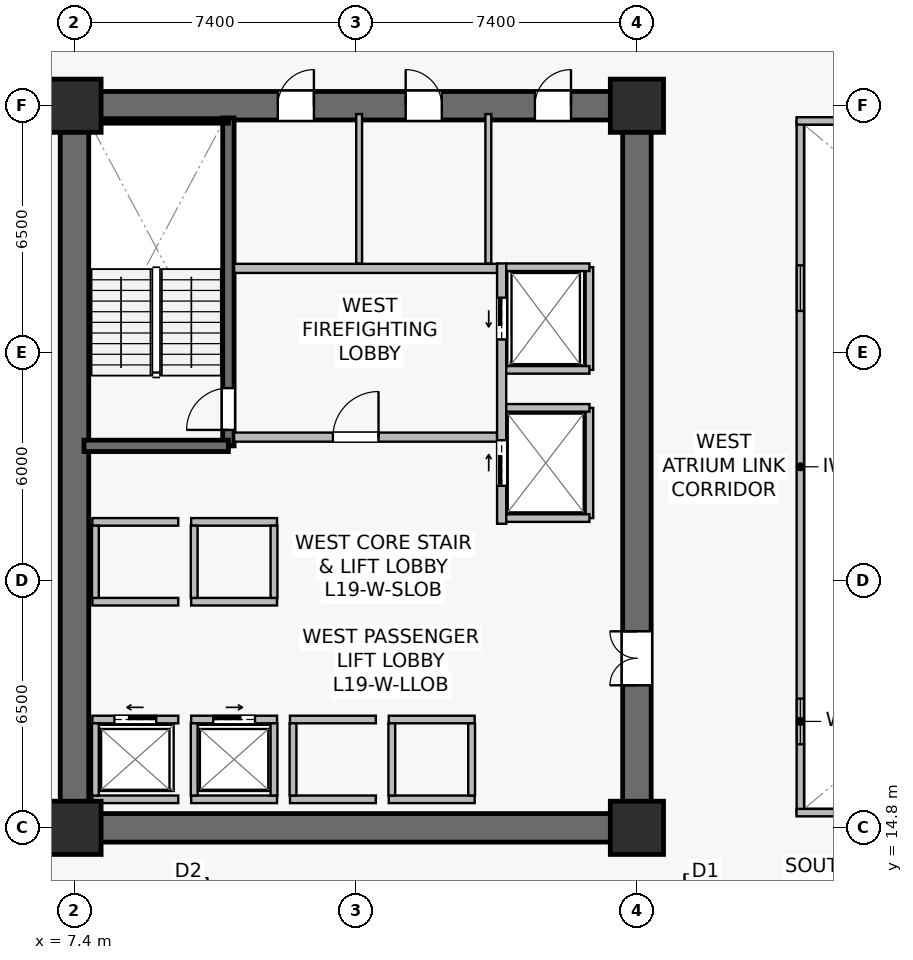
"""IFC4 building model, lengths in metres.
Left out: names, types, materials, properties, quantities, classifications, styles, units other than length and angle.
Written with IfcOpenShell. Run it as: python <this file> out.ifc"""

import sys

from ifc_helpers import new_model, si_unit, direction, frame, frame_2d, origin, origin_2d, place, context, subcontext, project, spatial, rectangle, extrude, source, transform, mapped, element, fill, save


model = new_model("IFC4")
c1 = context("Model", 3, precision=1e-05, world=origin(), true_north=direction((0.0, 1.0)))
c2 = subcontext(c1, "Body", "Model", "MODEL_VIEW")
j1 = project(units=[si_unit("LENGTHUNIT", "METRE"), si_unit("PLANEANGLEUNIT", "RADIAN")], contexts=[c1])
p1 = place(None, origin())
s1 = spatial("IfcSite", under=j1, at=p1, CompositionType="ELEMENT")
p2 = place(p1, origin())
s2 = spatial("IfcBuilding", under=s1, at=p2, CompositionType="ELEMENT")
p3 = place(p2, frame((0.0, 0.0, 78.5)))
s3 = spatial("IfcBuildingStorey", under=s2, at=p3, CompositionType="ELEMENT", Elevation=78.5)
p4 = place(p3, frame((7.025, 14.8, 0.0), z_axis=(0.0, 0.0, 1.0), x_axis=(1.0, 0.0, 0.0)))
e1 = element("IfcWall", 1, at=p4, inside=s3, PredefinedType="SHEAR", context=c2, shape_type="SweptSolid", body=[
    extrude(rectangle(XDim=15.55, YDim=0.75, at=frame_2d((7.775, 0.0))), origin(), (0.0, 0.0, 1.0), 3.78),
])
p5 = place(p3, frame((7.025, 33.8, 0.0), z_axis=(0.0, 0.0, 1.0), x_axis=(1.0, 0.0, 0.0)))
e2 = element("IfcWall", 2, at=p5, inside=s3, PredefinedType="SHEAR", context=c2, shape_type="SweptSolid", body=[
    extrude(rectangle(XDim=15.55, YDim=0.75, at=frame_2d((7.775, 0.0))), origin(), (0.0, 0.0, 1.0), 3.78),
])
p6 = place(p5, frame((5.725, 0.0, 0.0)))
e3 = element("IfcOpeningElement", 3, at=p6, cuts=e2, PredefinedType="OPENING", context=c2, shape_type="SweptSolid", body=[
    extrude(rectangle(XDim=0.95, YDim=2.15, at=frame_2d((0.475, 1.075))), frame((0.0, 0.385, 0.0), z_axis=(0.0, -1.0, 0.0), x_axis=(1.0, 0.0, 0.0)), (0.0, 0.0, 1.0), 0.77),
])
p7 = place(p5, frame((9.09, 0.0, 0.0)))
e4 = element("IfcOpeningElement", 4, at=p7, cuts=e2, PredefinedType="OPENING", context=c2, shape_type="SweptSolid", body=[
    extrude(rectangle(XDim=0.95, YDim=2.15, at=frame_2d((0.475, 1.075))), frame((0.0, 0.385, 0.0), z_axis=(0.0, -1.0, 0.0), x_axis=(1.0, 0.0, 0.0)), (0.0, 0.0, 1.0), 0.77),
])
p8 = place(p5, frame((12.49, 0.0, 0.0)))
e5 = element("IfcOpeningElement", 5, at=p8, cuts=e2, PredefinedType="OPENING", context=c2, shape_type="SweptSolid", body=[
    extrude(rectangle(XDim=0.95, YDim=2.15, at=frame_2d((0.475, 1.075))), frame((0.0, 0.385, 0.0), z_axis=(0.0, -1.0, 0.0), x_axis=(1.0, 0.0, 0.0)), (0.0, 0.0, 1.0), 0.77),
])
p9 = place(p3, frame((7.4, 15.175, 0.0), z_axis=(0.0, 0.0, 1.0), x_axis=(0.0, 1.0, 0.0)))
e6 = element("IfcWall", 6, at=p9, inside=s3, PredefinedType="SHEAR", context=c2, shape_type="SweptSolid", body=[
    extrude(rectangle(XDim=18.25, YDim=0.75, at=frame_2d((9.125, 0.0))), origin(), (0.0, 0.0, 1.0), 3.78),
])
p10 = place(p3, frame((22.2, 15.175, 0.0), z_axis=(0.0, 0.0, 1.0), x_axis=(0.0, 1.0, 0.0)))
e7 = element("IfcWall", 7, at=p10, inside=s3, PredefinedType="SHEAR", context=c2, shape_type="SweptSolid", body=[
    extrude(rectangle(XDim=18.25, YDim=0.75, at=frame_2d((9.125, 0.0))), origin(), (0.0, 0.0, 1.0), 3.78),
])
p11 = place(p10, frame((3.375, 0.0, 0.0)))
e8 = element("IfcOpeningElement", 8, at=p11, cuts=e7, PredefinedType="OPENING", context=c2, shape_type="SweptSolid", body=[
    extrude(rectangle(XDim=1.42, YDim=2.2, at=frame_2d((0.71, 1.1))), frame((0.0, 0.385, 0.0), z_axis=(0.0, -1.0, 0.0), x_axis=(1.0, 0.0, 0.0)), (0.0, 0.0, 1.0), 0.77),
])
p12 = place(p3, frame((11.45, 24.85, 0.0), z_axis=(0.0, 0.0, 1.0), x_axis=(0.0, 1.0, 0.0)))
e9 = element("IfcWall", 9, at=p12, inside=s3, PredefinedType="SHEAR", context=c2, shape_type="SweptSolid", body=[
    extrude(rectangle(XDim=8.63, YDim=0.3, at=frame_2d((4.315, 0.0))), origin(), (0.0, 0.0, 1.0), 3.78),
])
p13 = place(p12, frame((0.42, 0.0, 0.0)))
e10 = element("IfcOpeningElement", 10, at=p13, cuts=e9, PredefinedType="OPENING", context=c2, shape_type="SweptSolid", body=[
    extrude(rectangle(XDim=1.1, YDim=2.15, at=frame_2d((0.55, 1.075))), frame((0.0, 0.16, 0.0), z_axis=(0.0, -1.0, 0.0), x_axis=(1.0, 0.0, 0.0)), (0.0, 0.0, 1.0), 0.32),
])
p14 = place(p3, frame((7.65, 24.85, 0.0), z_axis=(0.0, 0.0, 1.0), x_axis=(1.0, 0.0, 0.0)))
e11 = element("IfcWall", 11, at=p14, inside=s3, PredefinedType="SHEAR", context=c2, shape_type="SweptSolid", body=[
    extrude(rectangle(XDim=3.8, YDim=0.3, at=frame_2d((1.9, 0.0))), origin(), (0.0, 0.0, 1.0), 3.78),
])
p15 = place(p3, frame((7.73, 33.4, 0.0), z_axis=(0.0, 0.0, 1.0), x_axis=(1.0, 0.0, 0.0)))
e12 = element("IfcWall", 12, at=p15, inside=s3, PredefinedType="SOLIDWALL", context=c2, shape_type="SweptSolid", body=[
    extrude(rectangle(XDim=3.72, YDim=0.12, at=frame_2d((1.86, 0.0))), origin(), (0.0, 0.0, 1.0), 3.78),
])
m1 = source(origin(), c2, "Body", "SweptSolid", [
    extrude(rectangle(XDim=1.4, YDim=1.4, at=origin_2d()), origin(), (0.0, 0.0, 1.0), 4.1),
])
for number, where, z_axis, x_axis in (
    (13, (7.4, 14.8, 0.0), (0.0, 0.0, 1.0), (1.0, 0.0, 0.0)),
    (14, (22.2, 14.8, 0.0), (0.0, 0.0, 1.0), (1.0, 0.0, 0.0)),
    (15, (7.4, 33.8, 0.0), (0.0, 0.0, 1.0), (1.0, 0.0, 0.0)),
    (16, (22.2, 33.8, 0.0), (0.0, 0.0, 1.0), (1.0, 0.0, 0.0)),
):
    element("IfcColumn", number, at=place(p3, frame(where, z_axis=z_axis, x_axis=x_axis)), inside=s3, PredefinedType="COLUMN", context=c2, shape_type="MappedRepresentation", body=[
        mapped(m1, transform((0.0, 0.0, 0.0), scale=1.0)),
    ])
p16 = place(p3, frame((11.6, 25.08, 0.0), z_axis=(0.0, 0.0, 1.0), x_axis=(1.0, 0.0, 0.0)))
e17 = element("IfcWall", 17, at=p16, inside=s3, PredefinedType="SOLIDWALL", context=c2, shape_type="SweptSolid", body=[
    extrude(rectangle(XDim=6.92, YDim=0.24, at=frame_2d((3.46, 0.0))), origin(), (0.0, 0.0, 1.0), 3.115),
])
p17 = place(p16, frame((2.6, 0.0, 0.0)))
e18 = element("IfcOpeningElement", 18, at=p17, cuts=e17, PredefinedType="OPENING", context=c2, shape_type="SweptSolid", body=[
    extrude(rectangle(XDim=1.2, YDim=2.16, at=frame_2d((0.6, 1.08))), frame((0.0, 0.13, 0.0), z_axis=(0.0, -1.0, 0.0), x_axis=(1.0, 0.0, 0.0)), (0.0, 0.0, 1.0), 0.26),
])
p18 = place(p3, frame((11.6, 29.52, 0.0), z_axis=(0.0, 0.0, 1.0), x_axis=(1.0, 0.0, 0.0)))
e19 = element("IfcWall", 19, at=p18, inside=s3, PredefinedType="SOLIDWALL", context=c2, shape_type="SweptSolid", body=[
    extrude(rectangle(XDim=6.92, YDim=0.24, at=frame_2d((3.46, 0.0))), origin(), (0.0, 0.0, 1.0), 3.115),
])
p19 = place(p3, frame((18.64, 22.8, 0.0), z_axis=(0.0, 0.0, 1.0), x_axis=(0.0, 1.0, 0.0)))
e20 = element("IfcWall", 20, at=p19, inside=s3, PredefinedType="SOLIDWALL", context=c2, shape_type="SweptSolid", body=[
    extrude(rectangle(XDim=6.85, YDim=0.24, at=frame_2d((3.425, 0.0))), origin(), (0.0, 0.0, 1.0), 2.865),
])
p20 = place(p19, frame((4.85, 0.0, 0.0)))
e21 = element("IfcOpeningElement", 21, at=p20, cuts=e20, PredefinedType="OPENING", context=c2, shape_type="SweptSolid", body=[
    extrude(rectangle(XDim=1.1, YDim=2.22, at=frame_2d((0.55, 1.11))), frame((0.0, 0.13, 0.0), z_axis=(0.0, -1.0, 0.0), x_axis=(1.0, 0.0, 0.0)), (0.0, 0.0, 1.0), 0.26),
])
p21 = place(p19, frame((1.0, 0.0, 0.0)))
e22 = element("IfcOpeningElement", 22, at=p21, cuts=e20, PredefinedType="OPENING", context=c2, shape_type="SweptSolid", body=[
    extrude(rectangle(XDim=1.2, YDim=2.22, at=frame_2d((0.6, 1.11))), frame((0.0, 0.13, 0.0), z_axis=(0.0, -1.0, 0.0), x_axis=(1.0, 0.0, 0.0)), (0.0, 0.0, 1.0), 0.26),
])
p22 = place(p3, frame((7.87, 17.65, 0.0), z_axis=(0.0, 0.0, 1.0), x_axis=(1.0, 0.0, 0.0)))
e23 = element("IfcWall", 23, at=p22, inside=s3, PredefinedType="SOLIDWALL", context=c2, shape_type="SweptSolid", body=[
    extrude(rectangle(XDim=2.26, YDim=0.2, at=frame_2d((1.13, 0.0))), origin(), (0.0, 0.0, 1.0), 3.78),
])
p23 = place(p22, frame((0.58, 0.0, 0.0)))
e24 = element("IfcOpeningElement", 24, at=p23, cuts=e23, PredefinedType="OPENING", context=c2, shape_type="SweptSolid", body=[
    extrude(rectangle(XDim=1.1, YDim=2.22, at=frame_2d((0.55, 1.11))), frame((0.0, 0.11, 0.0), z_axis=(0.0, -1.0, 0.0), x_axis=(1.0, 0.0, 0.0)), (0.0, 0.0, 1.0), 0.22),
])
p24 = place(p3, frame((7.87, 15.55, 0.0), z_axis=(0.0, 0.0, 1.0), x_axis=(1.0, 0.0, 0.0)))
e25 = element("IfcWall", 25, at=p24, inside=s3, PredefinedType="SOLIDWALL", context=c2, shape_type="SweptSolid", body=[
    extrude(rectangle(XDim=2.26, YDim=0.2, at=frame_2d((1.13, 0.0))), origin(), (0.0, 0.0, 1.0), 3.78),
])
p25 = place(p3, frame((7.95, 15.65, 0.0), z_axis=(0.0, 0.0, 1.0), x_axis=(0.0, 1.0, 0.0)))
e26 = element("IfcWall", 26, at=p25, inside=s3, PredefinedType="SOLIDWALL", context=c2, shape_type="SweptSolid", body=[
    extrude(rectangle(XDim=1.9, YDim=0.18, at=frame_2d((0.95, 0.0))), origin(), (0.0, 0.0, 1.0), 3.78),
])
p26 = place(p3, frame((10.47, 17.65, 0.0), z_axis=(0.0, 0.0, 1.0), x_axis=(1.0, 0.0, 0.0)))
e27 = element("IfcWall", 27, at=p26, inside=s3, PredefinedType="SOLIDWALL", context=c2, shape_type="SweptSolid", body=[
    extrude(rectangle(XDim=2.26, YDim=0.2, at=frame_2d((1.13, 0.0))), origin(), (0.0, 0.0, 1.0), 3.78),
])
p27 = place(p26, frame((0.58, 0.0, 0.0)))
e28 = element("IfcOpeningElement", 28, at=p27, cuts=e27, PredefinedType="OPENING", context=c2, shape_type="SweptSolid", body=[
    extrude(rectangle(XDim=1.1, YDim=2.22, at=frame_2d((0.55, 1.11))), frame((0.0, 0.11, 0.0), z_axis=(0.0, -1.0, 0.0), x_axis=(1.0, 0.0, 0.0)), (0.0, 0.0, 1.0), 0.22),
])
p28 = place(p3, frame((10.47, 15.55, 0.0), z_axis=(0.0, 0.0, 1.0), x_axis=(1.0, 0.0, 0.0)))
e29 = element("IfcWall", 29, at=p28, inside=s3, PredefinedType="SOLIDWALL", context=c2, shape_type="SweptSolid", body=[
    extrude(rectangle(XDim=2.26, YDim=0.2, at=frame_2d((1.13, 0.0))), origin(), (0.0, 0.0, 1.0), 3.78),
])
for number, where, z_axis, x_axis in (
    (30, (10.55, 15.65, 0.0), (0.0, 0.0, 1.0), (0.0, 1.0, 0.0)),
    (31, (12.65, 15.65, 0.0), (0.0, 0.0, 1.0), (0.0, 1.0, 0.0)),
):
    element("IfcWall", number, at=place(p3, frame(where, z_axis=z_axis, x_axis=x_axis)), inside=s3, PredefinedType="SOLIDWALL", context=c2, shape_type="SweptSolid", body=[
        extrude(rectangle(XDim=1.9, YDim=0.18, at=frame_2d((0.95, 0.0))), origin(), (0.0, 0.0, 1.0), 3.78),
    ])
for number, where, z_axis, x_axis in (
    (32, (13.07, 17.65, 0.0), (0.0, 0.0, 1.0), (1.0, 0.0, 0.0)),
    (33, (13.07, 15.55, 0.0), (0.0, 0.0, 1.0), (1.0, 0.0, 0.0)),
):
    element("IfcWall", number, at=place(p3, frame(where, z_axis=z_axis, x_axis=x_axis)), inside=s3, PredefinedType="SOLIDWALL", context=c2, shape_type="SweptSolid", body=[
        extrude(rectangle(XDim=2.26, YDim=0.2, at=frame_2d((1.13, 0.0))), origin(), (0.0, 0.0, 1.0), 3.115),
    ])
p29 = place(p3, frame((13.15, 15.65, 0.0), z_axis=(0.0, 0.0, 1.0), x_axis=(0.0, 1.0, 0.0)))
e34 = element("IfcWall", 34, at=p29, inside=s3, PredefinedType="SOLIDWALL", context=c2, shape_type="SweptSolid", body=[
    extrude(rectangle(XDim=1.9, YDim=0.18, at=frame_2d((0.95, 0.0))), origin(), (0.0, 0.0, 1.0), 3.78),
])
for number, where, z_axis, x_axis in (
    (35, (15.67, 17.65, 0.0), (0.0, 0.0, 1.0), (1.0, 0.0, 0.0)),
    (36, (15.67, 15.55, 0.0), (0.0, 0.0, 1.0), (1.0, 0.0, 0.0)),
):
    element("IfcWall", number, at=place(p3, frame(where, z_axis=z_axis, x_axis=x_axis)), inside=s3, PredefinedType="SOLIDWALL", context=c2, shape_type="SweptSolid", body=[
        extrude(rectangle(XDim=2.26, YDim=0.2, at=frame_2d((1.13, 0.0))), origin(), (0.0, 0.0, 1.0), 3.78),
    ])
for number, where, z_axis, x_axis in (
    (37, (15.75, 15.65, 0.0), (0.0, 0.0, 1.0), (0.0, 1.0, 0.0)),
    (38, (17.85, 15.65, 0.0), (0.0, 0.0, 1.0), (0.0, 1.0, 0.0)),
):
    element("IfcWall", number, at=place(p3, frame(where, z_axis=z_axis, x_axis=x_axis)), inside=s3, PredefinedType="SOLIDWALL", context=c2, shape_type="SweptSolid", body=[
        extrude(rectangle(XDim=1.9, YDim=0.18, at=frame_2d((0.95, 0.0))), origin(), (0.0, 0.0, 1.0), 3.78),
    ])
for number, where, z_axis, x_axis in (
    (39, (7.87, 20.75, 0.0), (0.0, 0.0, 1.0), (1.0, 0.0, 0.0)),
    (40, (7.87, 22.85, 0.0), (0.0, 0.0, 1.0), (1.0, 0.0, 0.0)),
):
    element("IfcWall", number, at=place(p3, frame(where, z_axis=z_axis, x_axis=x_axis)), inside=s3, PredefinedType="SOLIDWALL", context=c2, shape_type="SweptSolid", body=[
        extrude(rectangle(XDim=2.26, YDim=0.2, at=frame_2d((1.13, 0.0))), origin(), (0.0, 0.0, 1.0), 3.78),
    ])
p30 = place(p3, frame((7.95, 20.85, 0.0), z_axis=(0.0, 0.0, 1.0), x_axis=(0.0, 1.0, 0.0)))
e41 = element("IfcWall", 41, at=p30, inside=s3, PredefinedType="SOLIDWALL", context=c2, shape_type="SweptSolid", body=[
    extrude(rectangle(XDim=1.9, YDim=0.18, at=frame_2d((0.95, 0.0))), origin(), (0.0, 0.0, 1.0), 3.78),
])
for number, where, z_axis, x_axis in (
    (42, (10.47, 20.75, 0.0), (0.0, 0.0, 1.0), (1.0, 0.0, 0.0)),
    (43, (10.47, 22.85, 0.0), (0.0, 0.0, 1.0), (1.0, 0.0, 0.0)),
):
    element("IfcWall", number, at=place(p3, frame(where, z_axis=z_axis, x_axis=x_axis)), inside=s3, PredefinedType="SOLIDWALL", context=c2, shape_type="SweptSolid", body=[
        extrude(rectangle(XDim=2.26, YDim=0.2, at=frame_2d((1.13, 0.0))), origin(), (0.0, 0.0, 1.0), 3.78),
    ])
for number, where, z_axis, x_axis in (
    (44, (10.55, 20.85, 0.0), (0.0, 0.0, 1.0), (0.0, 1.0, 0.0)),
    (45, (12.65, 20.85, 0.0), (0.0, 0.0, 1.0), (0.0, 1.0, 0.0)),
):
    element("IfcWall", number, at=place(p3, frame(where, z_axis=z_axis, x_axis=x_axis)), inside=s3, PredefinedType="SOLIDWALL", context=c2, shape_type="SweptSolid", body=[
        extrude(rectangle(XDim=1.9, YDim=0.18, at=frame_2d((0.95, 0.0))), origin(), (0.0, 0.0, 1.0), 3.78),
    ])
p31 = place(p3, frame((20.95, 26.85, 0.0), z_axis=(0.0, 0.0, 1.0), x_axis=(0.0, 1.0, 0.0)))
e46 = element("IfcWall", 46, at=p31, inside=s3, PredefinedType="SOLIDWALL", context=c2, shape_type="SweptSolid", body=[
    extrude(rectangle(XDim=2.7, YDim=0.2, at=frame_2d((1.35, 0.0))), origin(), (0.0, 0.0, 1.0), 3.78),
])
p32 = place(p3, frame((18.76, 29.55, 0.0), z_axis=(0.0, 0.0, 1.0), x_axis=(1.0, 0.0, 0.0)))
e47 = element("IfcWall", 47, at=p32, inside=s3, PredefinedType="SOLIDWALL", context=c2, shape_type="SweptSolid", body=[
    extrude(rectangle(XDim=2.19, YDim=0.2, at=frame_2d((1.095, 0.0))), origin(), (0.0, 0.0, 1.0), 3.78),
])
p33 = place(p3, frame((18.76, 26.85, 0.0), z_axis=(0.0, 0.0, 1.0), x_axis=(1.0, 0.0, 0.0)))
e48 = element("IfcWall", 48, at=p33, inside=s3, PredefinedType="SOLIDWALL", context=c2, shape_type="SweptSolid", body=[
    extrude(rectangle(XDim=2.19, YDim=0.2, at=frame_2d((1.095, 0.0))), origin(), (0.0, 0.0, 1.0), 3.177),
])
p34 = place(p3, frame((20.95, 22.95, 0.0), z_axis=(0.0, 0.0, 1.0), x_axis=(0.0, 1.0, 0.0)))
e49 = element("IfcWall", 49, at=p34, inside=s3, PredefinedType="SOLIDWALL", context=c2, shape_type="SweptSolid", body=[
    extrude(rectangle(XDim=2.9, YDim=0.2, at=frame_2d((1.45, 0.0))), origin(), (0.0, 0.0, 1.0), 2.865),
])
for number, where, z_axis, x_axis in (
    (50, (18.76, 25.85, 0.0), (0.0, 0.0, 1.0), (1.0, 0.0, 0.0)),
    (51, (18.76, 22.95, 0.0), (0.0, 0.0, 1.0), (1.0, 0.0, 0.0)),
):
    element("IfcWall", number, at=place(p3, frame(where, z_axis=z_axis, x_axis=x_axis)), inside=s3, PredefinedType="SOLIDWALL", context=c2, shape_type="SweptSolid", body=[
        extrude(rectangle(XDim=2.19, YDim=0.2, at=frame_2d((1.095, 0.0))), origin(), (0.0, 0.0, 1.0), 3.78),
    ])
p35 = place(p3, frame((14.89, 29.65, 0.0), z_axis=(0.0, 0.0, 1.0), x_axis=(0.0, 1.0, 0.0)))
e52 = element("IfcWall", 52, at=p35, inside=s3, PredefinedType="PLUMBINGWALL", context=c2, shape_type="SweptSolid", body=[
    extrude(rectangle(XDim=3.93, YDim=0.155, at=frame_2d((1.965, 0.0))), origin(), (0.0, 0.0, 1.0), 3.115),
])
p36 = place(p3, frame((18.29, 29.65, 0.0), z_axis=(0.0, 0.0, 1.0), x_axis=(0.0, 1.0, 0.0)))
e53 = element("IfcWall", 53, at=p36, inside=s3, PredefinedType="PLUMBINGWALL", context=c2, shape_type="SweptSolid", body=[
    extrude(rectangle(XDim=3.93, YDim=0.155, at=frame_2d((1.965, 0.0))), origin(), (0.0, 0.0, 1.0), 3.78),
])
p37 = place(p3, frame((26.5, 15.2, 0.0), z_axis=(0.0, 0.0, 1.0), x_axis=(0.0, 1.0, 0.0)))
e54 = element("IfcWall", 54, at=p37, inside=s3, PredefinedType="SOLIDWALL", context=c2, shape_type="SweptSolid", body=[
    extrude(rectangle(XDim=18.2, YDim=0.195, at=frame_2d((9.1, 0.0))), origin(), (0.0, 0.0, 1.0), 3.78),
])
p38 = place(p37, frame((1.8, 0.0, 0.9)))
e55 = element("IfcOpeningElement", 55, at=p38, cuts=e54, PredefinedType="OPENING", context=c2, shape_type="SweptSolid", body=[
    extrude(rectangle(XDim=1.2, YDim=1.35, at=frame_2d((0.6, 0.675))), frame((0.0, 0.107, 0.0), z_axis=(0.0, -1.0, 0.0), x_axis=(1.0, 0.0, 0.0)), (0.0, 0.0, 1.0), 0.215),
])
p39 = place(p37, frame((13.2, 0.0, 0.9)))
e56 = element("IfcOpeningElement", 56, at=p39, cuts=e54, PredefinedType="OPENING", context=c2, shape_type="SweptSolid", body=[
    extrude(rectangle(XDim=1.2, YDim=1.35, at=frame_2d((0.6, 0.675))), frame((0.0, 0.107, 0.0), z_axis=(0.0, -1.0, 0.0), x_axis=(1.0, 0.0, 0.0)), (0.0, 0.0, 1.0), 0.215),
])
for number, where, z_axis, x_axis in (
    (57, (26.4, 15.2, 0.0), (0.0, 0.0, 1.0), (1.0, 0.0, 0.0)),
    (58, (26.4, 33.4, 0.0), (0.0, 0.0, 1.0), (1.0, 0.0, 0.0)),
):
    element("IfcWall", number, at=place(p3, frame(where, z_axis=z_axis, x_axis=x_axis)), inside=s3, PredefinedType="SOLIDWALL", context=c2, shape_type="SweptSolid", body=[
        extrude(rectangle(XDim=22.0, YDim=0.195, at=frame_2d((11.0, 0.0))), origin(), (0.0, 0.0, 1.0), 3.78),
    ])
m2 = source(origin(), c2, "Body", "SweptSolid", [
    extrude(rectangle(XDim=1.2, YDim=1.35, at=frame_2d((0.6, 0.675))), frame((0.0, 0.03, 0.0), z_axis=(0.0, -1.0, 0.0), x_axis=(1.0, 0.0, 0.0)), (0.0, 0.0, 1.0), 0.06),
])
p40 = place(p38, origin())
e59 = element("IfcWindow", 59, at=p40, inside=s3, PartitioningType="SINGLE_PANEL", PredefinedType="WINDOW", context=c2, shape_type="MappedRepresentation", body=[
    mapped(m2, transform((0.0, 0.0, 0.0), scale=1.0)),
])
fill(e55, e59)
p41 = place(p39, origin())
e60 = element("IfcWindow", 60, at=p41, inside=s3, PartitioningType="SINGLE_PANEL", PredefinedType="WINDOW", context=c2, shape_type="MappedRepresentation", body=[
    mapped(m2, transform((0.0, 0.0, 0.0), scale=1.0)),
])
fill(e56, e60)
m3 = source(origin(), c2, "Body", "SweptSolid", [
    extrude(rectangle(XDim=1.1, YDim=2.15, at=frame_2d((0.55, 1.075))), frame((0.0, 0.025, 0.0), z_axis=(0.0, -1.0, 0.0), x_axis=(1.0, 0.0, 0.0)), (0.0, 0.0, 1.0), 0.05),
])
p42 = place(p13, origin())
e61 = element("IfcDoor", 61, at=p42, inside=s3, OperationType="SINGLE_SWING_LEFT", PredefinedType="DOOR", context=c2, shape_type="MappedRepresentation", body=[
    mapped(m3, transform((0.0, 0.0, 0.0), scale=1.0)),
])
fill(e10, e61)
m4 = source(origin(), c2, "Body", "SweptSolid", [
    extrude(rectangle(XDim=1.2, YDim=2.16, at=frame_2d((0.6, 1.08))), frame((0.0, 0.025, 0.0), z_axis=(0.0, -1.0, 0.0), x_axis=(1.0, 0.0, 0.0)), (0.0, 0.0, 1.0), 0.05),
])
p43 = place(p17, origin())
e62 = element("IfcDoor", 62, at=p43, inside=s3, OperationType="SINGLE_SWING_RIGHT", PredefinedType="DOOR", context=c2, shape_type="MappedRepresentation", body=[
    mapped(m4, transform((0.0, 0.0, 0.0), scale=1.0)),
])
fill(e18, e62)
m5 = source(origin(), c2, "Body", "SweptSolid", [
    extrude(rectangle(XDim=1.1, YDim=2.22, at=frame_2d((0.55, 1.11))), frame((0.0, 0.025, 0.0), z_axis=(0.0, -1.0, 0.0), x_axis=(1.0, 0.0, 0.0)), (0.0, 0.0, 1.0), 0.05),
])
p44 = place(p23, origin())
e63 = element("IfcDoor", 63, at=p44, inside=s3, OperationType="SLIDING_TO_LEFT", PredefinedType="USERDEFINED", context=c2, shape_type="MappedRepresentation", body=[
    mapped(m5, transform((0.0, 0.0, 0.0), scale=1.0)),
])
fill(e24, e63)
p45 = place(p27, origin())
e64 = element("IfcDoor", 64, at=p45, inside=s3, OperationType="SLIDING_TO_RIGHT", PredefinedType="USERDEFINED", context=c2, shape_type="MappedRepresentation", body=[
    mapped(m5, transform((0.0, 0.0, 0.0), scale=1.0)),
])
fill(e28, e64)
p46 = place(p20, origin())
e65 = element("IfcDoor", 65, at=p46, inside=s3, OperationType="SLIDING_TO_LEFT", PredefinedType="USERDEFINED", context=c2, shape_type="MappedRepresentation", body=[
    mapped(m5, transform((0.0, 0.0, 0.0), scale=1.0)),
])
fill(e21, e65)
m6 = source(origin(), c2, "Body", "SweptSolid", [
    extrude(rectangle(XDim=1.2, YDim=2.22, at=frame_2d((0.6, 1.11))), frame((0.0, 0.025, 0.0), z_axis=(0.0, -1.0, 0.0), x_axis=(1.0, 0.0, 0.0)), (0.0, 0.0, 1.0), 0.05),
])
p47 = place(p21, origin())
e66 = element("IfcDoor", 66, at=p47, inside=s3, OperationType="SLIDING_TO_RIGHT", PredefinedType="USERDEFINED", context=c2, shape_type="MappedRepresentation", body=[
    mapped(m6, transform((0.0, 0.0, 0.0), scale=1.0)),
])
fill(e22, e66)
m7 = source(origin(), c2, "Body", "SweptSolid", [
    extrude(rectangle(XDim=1.42, YDim=2.2, at=frame_2d((0.71, 1.1))), frame((0.0, 0.025, 0.0), z_axis=(0.0, -1.0, 0.0), x_axis=(1.0, 0.0, 0.0)), (0.0, 0.0, 1.0), 0.05),
])
p48 = place(p11, origin())
e67 = element("IfcDoor", 67, at=p48, inside=s3, OperationType="DOUBLE_DOOR_SINGLE_SWING", PredefinedType="DOOR", context=c2, shape_type="MappedRepresentation", body=[
    mapped(m7, transform((0.0, 0.0, 0.0), scale=1.0)),
])
fill(e8, e67)
m8 = source(origin(), c2, "Body", "SweptSolid", [
    extrude(rectangle(XDim=0.95, YDim=2.15, at=frame_2d((0.475, 1.075))), frame((0.0, 0.025, 0.0), z_axis=(0.0, -1.0, 0.0), x_axis=(1.0, 0.0, 0.0)), (0.0, 0.0, 1.0), 0.05),
])
p49 = place(p6, origin())
e68 = element("IfcDoor", 68, at=p49, inside=s3, OperationType="SINGLE_SWING_RIGHT", PredefinedType="DOOR", context=c2, shape_type="MappedRepresentation", body=[
    mapped(m8, transform((0.0, 0.0, 0.0), scale=1.0)),
])
fill(e3, e68)
p50 = place(p7, origin())
e69 = element("IfcDoor", 69, at=p50, inside=s3, OperationType="SINGLE_SWING_LEFT", PredefinedType="DOOR", context=c2, shape_type="MappedRepresentation", body=[
    mapped(m8, transform((0.0, 0.0, 0.0), scale=1.0)),
])
fill(e4, e69)
p51 = place(p8, origin())
e70 = element("IfcDoor", 70, at=p51, inside=s3, OperationType="SINGLE_SWING_RIGHT", PredefinedType="DOOR", context=c2, shape_type="MappedRepresentation", body=[
    mapped(m8, transform((0.0, 0.0, 0.0), scale=1.0)),
])
fill(e5, e70)
save(model, sys.argv[1])
